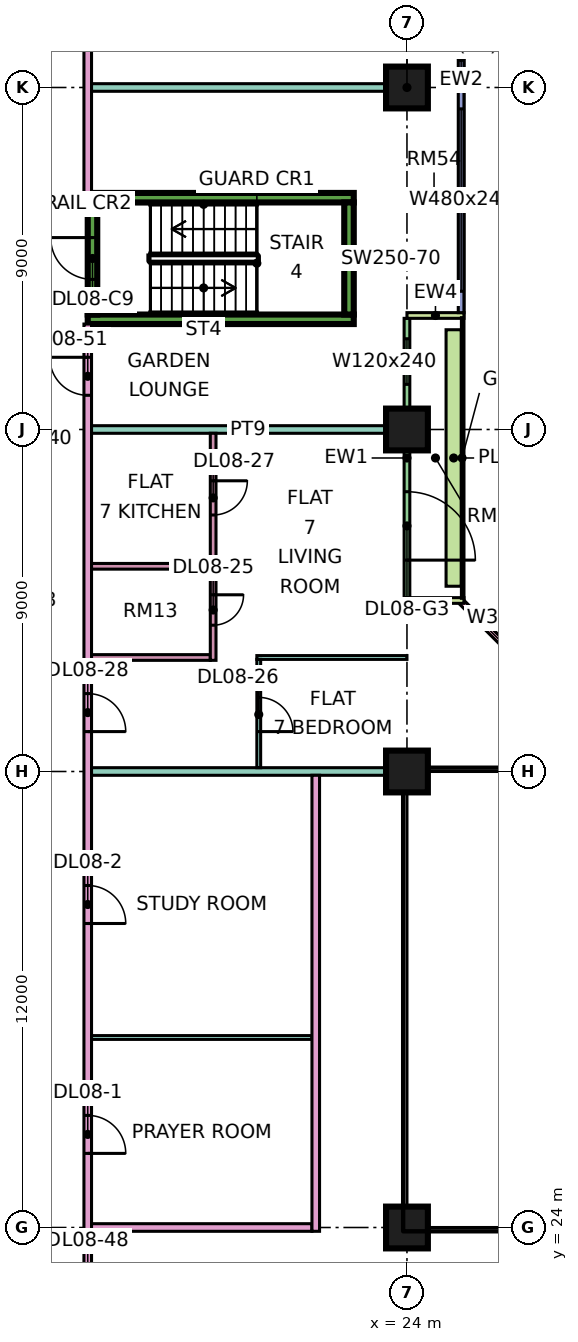
"""IFC4 building model, lengths in metres.
Left out: names, types, materials, properties, quantities, classifications, styles, units other than length and angle.
Written with IfcOpenShell. Run it as: python <this file> out.ifc"""

import sys

from ifc_helpers import new_model, si_unit, direction, frame, frame_2d, origin, origin_2d, place, context, subcontext, project, spatial, rectangle, extrude, element, fill, save


model = new_model("IFC4")
c1 = context("Model", 3, precision=1e-05, world=origin(), true_north=direction((0.0, 1.0)))
c2 = subcontext(c1, "Body", "Model", "MODEL_VIEW")
j1 = project(units=[si_unit("LENGTHUNIT", "METRE"), si_unit("PLANEANGLEUNIT", "RADIAN")], contexts=[c1])
p1 = place(None, origin())
s1 = spatial("IfcSite", under=j1, at=p1, CompositionType="ELEMENT")
p2 = place(p1, origin())
s2 = spatial("IfcBuilding", under=s1, at=p2, CompositionType="ELEMENT")
p3 = place(p2, frame((0.0, 0.0, 45.15)))
s3 = spatial("IfcBuildingStorey", under=s2, at=p3, CompositionType="ELEMENT", Elevation=45.15)
for number, where, z_axis, x_axis in (
    (1, (24.0, 24.0, 0.0), (0.0, 0.0, 1.0), (1.0, 0.0, 0.0)),
    (2, (24.0, 36.0, 0.0), (0.0, 0.0, 1.0), (1.0, 0.0, 0.0)),
    (3, (24.0, 45.0, 0.0), (0.0, 0.0, 1.0), (1.0, 0.0, 0.0)),
    (4, (24.0, 54.0, 0.0), (0.0, 0.0, 1.0), (1.0, 0.0, 0.0)),
):
    element("IfcColumn", number, at=place(p3, frame(where, z_axis=z_axis, x_axis=x_axis)), inside=s3, PredefinedType="COLUMN", context=c2, shape_type="SweptSolid", body=[
        extrude(rectangle(XDim=1.1, YDim=1.1, at=origin_2d()), origin(), (0.0, 0.0, 1.0), 3.75),
    ])
for number, where, z_axis, x_axis in (
    (5, (15.6, 47.9, 0.0), (0.0, 0.0, 1.0), (1.0, 0.0, 0.0)),
    (6, (15.6, 51.1, 0.0), (0.0, 0.0, 1.0), (1.0, 0.0, 0.0)),
):
    element("IfcWall", number, at=place(p3, frame(where, z_axis=z_axis, x_axis=x_axis)), inside=s3, PredefinedType="SHEAR", context=c2, shape_type="SweptSolid", body=[
        extrude(rectangle(XDim=7.0, YDim=0.25, at=frame_2d((3.5, 0.0))), origin(), (0.0, 0.0, 1.0), 3.75),
    ])
p4 = place(p3, frame((15.725, 48.025, 0.0), z_axis=(0.0, 0.0, 1.0), x_axis=(0.0, 1.0, 0.0)))
e7 = element("IfcWall", 7, at=p4, inside=s3, PredefinedType="SHEAR", context=c2, shape_type="SweptSolid", body=[
    extrude(rectangle(XDim=2.95, YDim=0.25, at=frame_2d((1.475, 0.0))), origin(), (0.0, 0.0, 1.0), 3.75),
])
p5 = place(p4, frame((0.925, 0.0, 0.0)))
e8 = element("IfcOpeningElement", 8, at=p5, cuts=e7, PredefinedType="OPENING", context=c2, shape_type="SweptSolid", body=[
    extrude(rectangle(XDim=1.1, YDim=2.2, at=frame_2d((0.55, 1.1))), frame((0.0, 0.135, 0.0), z_axis=(0.0, -1.0, 0.0), x_axis=(1.0, 0.0, 0.0)), (0.0, 0.0, 1.0), 0.27),
])
p6 = place(p3, frame((22.475, 48.025, 0.0), z_axis=(0.0, 0.0, 1.0), x_axis=(0.0, 1.0, 0.0)))
e9 = element("IfcWall", 9, at=p6, inside=s3, PredefinedType="SHEAR", context=c2, shape_type="SweptSolid", body=[
    extrude(rectangle(XDim=2.95, YDim=0.25, at=frame_2d((1.475, 0.0))), origin(), (0.0, 0.0, 1.0), 3.75),
])
p7 = place(p3, frame((28.447, 37.447, 0.0), z_axis=(0.0, 0.0, 1.0), x_axis=(-0.707106781187, 0.707106781187, 0.0)))
e10 = element("IfcWall", 10, at=p7, inside=s3, PredefinedType="SOLIDWALL", context=c2, shape_type="SweptSolid", body=[
    extrude(rectangle(XDim=4.243, YDim=0.15, at=frame_2d((2.121, 0.0))), origin(), (0.0, 0.0, 1.0), 3.35),
])
p8 = place(p7, frame((0.621, 0.0, 0.45)))
e11 = element("IfcOpeningElement", 11, at=p8, cuts=e10, PredefinedType="OPENING", context=c2, shape_type="SweptSolid", body=[
    extrude(rectangle(XDim=3.0, YDim=2.4, at=frame_2d((1.5, 1.2))), frame((0.0, 0.085, 0.0), z_axis=(0.0, -1.0, 0.0), x_axis=(1.0, 0.0, 0.0)), (0.0, 0.0, 1.0), 0.17),
])
p9 = place(p3, frame((24.0, 40.575, 0.0), z_axis=(0.0, 0.0, 1.0), x_axis=(0.0, 1.0, 0.0)))
e12 = element("IfcWall", 12, at=p9, inside=s3, PredefinedType="SOLIDWALL", context=c2, shape_type="SweptSolid", body=[
    extrude(rectangle(XDim=7.35, YDim=0.15, at=frame_2d((3.675, 0.0))), origin(), (0.0, 0.0, 1.0), 3.35),
])
p10 = place(p9, frame((0.988, 0.0, 0.0)))
e13 = element("IfcOpeningElement", 13, at=p10, cuts=e12, PredefinedType="OPENING", context=c2, shape_type="SweptSolid", body=[
    extrude(rectangle(XDim=1.8, YDim=2.4, at=frame_2d((0.9, 1.2))), frame((0.0, 0.085, 0.0), z_axis=(0.0, -1.0, 0.0), x_axis=(1.0, 0.0, 0.0)), (0.0, 0.0, 1.0), 0.17),
])
p11 = place(p9, frame((5.613, 0.0, 0.45)))
e14 = element("IfcOpeningElement", 14, at=p11, cuts=e12, PredefinedType="OPENING", context=c2, shape_type="SweptSolid", body=[
    extrude(rectangle(XDim=1.2, YDim=2.4, at=frame_2d((0.6, 1.2))), frame((0.0, 0.085, 0.0), z_axis=(0.0, -1.0, 0.0), x_axis=(1.0, 0.0, 0.0)), (0.0, 0.0, 1.0), 0.17),
])
for number, where, z_axis, x_axis in (
    (15, (25.5, 40.5, 0.0), (0.0, 0.0, 1.0), (-1.0, 0.0, 0.0)),
    (16, (25.5, 48.0, 0.0), (0.0, 0.0, 1.0), (-1.0, 0.0, 0.0)),
):
    element("IfcWall", number, at=place(p3, frame(where, z_axis=z_axis, x_axis=x_axis)), inside=s3, PredefinedType="SOLIDWALL", context=c2, shape_type="SweptSolid", body=[
        extrude(rectangle(XDim=1.5, YDim=0.15, at=frame_2d((0.75, 0.0))), origin(), (0.0, 0.0, 1.0), 3.35),
    ])
p12 = place(p3, frame((25.425, 48.075, 0.0), z_axis=(0.0, 0.0, 1.0), x_axis=(0.0, 1.0, 0.0)))
e17 = element("IfcWall", 17, at=p12, inside=s3, PredefinedType="SOLIDWALL", context=c2, shape_type="SweptSolid", body=[
    extrude(rectangle(XDim=13.425, YDim=0.15, at=frame_2d((6.712, 0.0))), origin(), (0.0, 0.0, 1.0), 3.35),
])
p13 = place(p12, frame((0.562, 0.0, 0.45)))
e18 = element("IfcOpeningElement", 18, at=p13, cuts=e17, PredefinedType="OPENING", context=c2, shape_type="SweptSolid", body=[
    extrude(rectangle(XDim=4.8, YDim=2.4, at=frame_2d((2.4, 1.2))), frame((0.0, 0.085, 0.0), z_axis=(0.0, -1.0, 0.0), x_axis=(1.0, 0.0, 0.0)), (0.0, 0.0, 1.0), 0.17),
])
p14 = place(p12, frame((7.425, 0.0, 0.45)))
e19 = element("IfcOpeningElement", 19, at=p14, cuts=e17, PredefinedType="OPENING", context=c2, shape_type="SweptSolid", body=[
    extrude(rectangle(XDim=3.0, YDim=2.4, at=frame_2d((1.5, 1.2))), frame((0.0, 0.085, 0.0), z_axis=(0.0, -1.0, 0.0), x_axis=(1.0, 0.0, 0.0)), (0.0, 0.0, 1.0), 0.17),
])
p15 = place(p12, frame((12.225, 0.0, 0.45)))
e20 = element("IfcOpeningElement", 20, at=p15, cuts=e17, PredefinedType="OPENING", context=c2, shape_type="SweptSolid", body=[
    extrude(rectangle(XDim=0.9, YDim=2.4, at=frame_2d((0.45, 1.2))), frame((0.0, 0.085, 0.0), z_axis=(0.0, -1.0, 0.0), x_axis=(1.0, 0.0, 0.0)), (0.0, 0.0, 1.0), 0.17),
])
p16 = place(p3, frame((25.229, 40.875, 0.0), z_axis=(0.0, 0.0, 1.0), x_axis=(0.0, 1.0, 0.0)))
e21 = element("IfcWall", 21, at=p16, inside=s3, PredefinedType="SOLIDWALL", context=c2, shape_type="SweptSolid", body=[
    extrude(rectangle(XDim=6.75, YDim=0.4, at=frame_2d((3.375, 0.0))), origin(), (0.0, 0.0, 1.0), 0.7),
])
p17 = place(p3, frame((15.6, 20.0, 0.0), z_axis=(0.0, 0.0, 1.0), x_axis=(0.0, 1.0, 0.0)))
e22 = element("IfcWall", 22, at=p17, inside=s3, PredefinedType="PARTITIONING", context=c2, shape_type="SweptSolid", body=[
    extrude(rectangle(XDim=27.775, YDim=0.2, at=frame_2d((13.887, 0.0))), origin(), (0.0, 0.0, 1.0), 3.35),
])
p18 = place(p17, frame((5.95, 0.0, 0.0)))
e23 = element("IfcOpeningElement", 23, at=p18, cuts=e22, PredefinedType="OPENING", context=c2, shape_type="SweptSolid", body=[
    extrude(rectangle(XDim=1.0, YDim=2.1, at=frame_2d((0.5, 1.05))), frame((0.0, 0.11, 0.0), z_axis=(0.0, -1.0, 0.0), x_axis=(1.0, 0.0, 0.0)), (0.0, 0.0, 1.0), 0.22),
])
p19 = place(p17, frame((12.0, 0.0, 0.0)))
e24 = element("IfcOpeningElement", 24, at=p19, cuts=e22, PredefinedType="OPENING", context=c2, shape_type="SweptSolid", body=[
    extrude(rectangle(XDim=1.0, YDim=2.1, at=frame_2d((0.5, 1.05))), frame((0.0, 0.11, 0.0), z_axis=(0.0, -1.0, 0.0), x_axis=(1.0, 0.0, 0.0)), (0.0, 0.0, 1.0), 0.22),
])
p20 = place(p17, frame((17.05, 0.0, 0.0)))
e25 = element("IfcOpeningElement", 25, at=p20, cuts=e22, PredefinedType="OPENING", context=c2, shape_type="SweptSolid", body=[
    extrude(rectangle(XDim=1.0, YDim=2.1, at=frame_2d((0.5, 1.05))), frame((0.0, 0.11, 0.0), z_axis=(0.0, -1.0, 0.0), x_axis=(1.0, 0.0, 0.0)), (0.0, 0.0, 1.0), 0.22),
])
p21 = place(p17, frame((1.15, 0.0, 0.0)))
e26 = element("IfcOpeningElement", 26, at=p21, cuts=e22, PredefinedType="OPENING", context=c2, shape_type="SweptSolid", body=[
    extrude(rectangle(XDim=1.8, YDim=2.1, at=frame_2d((0.9, 1.05))), frame((0.0, 0.11, 0.0), z_axis=(0.0, -1.0, 0.0), x_axis=(1.0, 0.0, 0.0)), (0.0, 0.0, 1.0), 0.22),
])
p22 = place(p17, frame((25.9, 0.0, 0.0)))
e27 = element("IfcOpeningElement", 27, at=p22, cuts=e22, PredefinedType="OPENING", context=c2, shape_type="SweptSolid", body=[
    extrude(rectangle(XDim=1.0, YDim=2.1, at=frame_2d((0.5, 1.05))), frame((0.0, 0.11, 0.0), z_axis=(0.0, -1.0, 0.0), x_axis=(1.0, 0.0, 0.0)), (0.0, 0.0, 1.0), 0.22),
])
p23 = place(p3, frame((15.6, 51.225, 0.0), z_axis=(0.0, 0.0, 1.0), x_axis=(0.0, 1.0, 0.0)))
e28 = element("IfcWall", 28, at=p23, inside=s3, PredefinedType="PARTITIONING", context=c2, shape_type="SweptSolid", body=[
    extrude(rectangle(XDim=11.701, YDim=0.2, at=frame_2d((5.851, 0.0))), origin(), (0.0, 0.0, 1.0), 3.35),
])
p24 = place(p23, frame((4.125, 0.0, 0.0)))
e29 = element("IfcOpeningElement", 29, at=p24, cuts=e28, PredefinedType="OPENING", context=c2, shape_type="SweptSolid", body=[
    extrude(rectangle(XDim=1.0, YDim=2.1, at=frame_2d((0.5, 1.05))), frame((0.0, 0.11, 0.0), z_axis=(0.0, -1.0, 0.0), x_axis=(1.0, 0.0, 0.0)), (0.0, 0.0, 1.0), 0.22),
])
p25 = place(p3, frame((15.7, 24.0, 0.0), z_axis=(0.0, 0.0, 1.0), x_axis=(1.0, 0.0, 0.0)))
e30 = element("IfcWall", 30, at=p25, inside=s3, PredefinedType="PARTITIONING", context=c2, shape_type="SweptSolid", body=[
    extrude(rectangle(XDim=5.8, YDim=0.2, at=frame_2d((2.9, 0.0))), origin(), (0.0, 0.0, 1.0), 3.35),
])
p26 = place(p3, frame((15.7, 29.0, 0.0), z_axis=(0.0, 0.0, 1.0), x_axis=(1.0, 0.0, 0.0)))
e31 = element("IfcWall", 31, at=p26, inside=s3, PredefinedType="PARTITIONING", context=c2, shape_type="SweptSolid", body=[
    extrude(rectangle(XDim=5.8, YDim=0.1, at=frame_2d((2.9, 0.0))), origin(), (0.0, 0.0, 1.0), 3.35),
])
p27 = place(p3, frame((15.7, 36.0, 0.0), z_axis=(0.0, 0.0, 1.0), x_axis=(1.0, 0.0, 0.0)))
e32 = element("IfcWall", 32, at=p27, inside=s3, PredefinedType="PARTITIONING", context=c2, shape_type="SweptSolid", body=[
    extrude(rectangle(XDim=8.3, YDim=0.2, at=frame_2d((4.15, 0.0))), origin(), (0.0, 0.0, 1.0), 3.35),
])
for number, where, z_axis, x_axis in (
    (33, (15.7, 39.0, 0.0), (0.0, 0.0, 1.0), (1.0, 0.0, 0.0)),
    (34, (15.7, 41.4, 0.0), (0.0, 0.0, 1.0), (1.0, 0.0, 0.0)),
):
    element("IfcWall", number, at=place(p3, frame(where, z_axis=z_axis, x_axis=x_axis)), inside=s3, PredefinedType="PARTITIONING", context=c2, shape_type="SweptSolid", body=[
        extrude(rectangle(XDim=3.125, YDim=0.15, at=frame_2d((1.562, 0.0))), origin(), (0.0, 0.0, 1.0), 3.35),
    ])
p28 = place(p3, frame((15.7, 45.0, 0.0), z_axis=(0.0, 0.0, 1.0), x_axis=(1.0, 0.0, 0.0)))
e35 = element("IfcWall", 35, at=p28, inside=s3, PredefinedType="PARTITIONING", context=c2, shape_type="SweptSolid", body=[
    extrude(rectangle(XDim=8.226, YDim=0.2, at=frame_2d((4.113, 0.0))), origin(), (0.0, 0.0, 1.0), 3.35),
])
p29 = place(p3, frame((15.7, 54.0, 0.0), z_axis=(0.0, 0.0, 1.0), x_axis=(1.0, 0.0, 0.0)))
e36 = element("IfcWall", 36, at=p29, inside=s3, PredefinedType="PARTITIONING", context=c2, shape_type="SweptSolid", body=[
    extrude(rectangle(XDim=8.3, YDim=0.2, at=frame_2d((4.15, 0.0))), origin(), (0.0, 0.0, 1.0), 3.35),
])
p30 = place(p3, frame((18.9, 38.925, 0.0), z_axis=(0.0, 0.0, 1.0), x_axis=(0.0, 1.0, 0.0)))
e37 = element("IfcWall", 37, at=p30, inside=s3, PredefinedType="PARTITIONING", context=c2, shape_type="SweptSolid", body=[
    extrude(rectangle(XDim=5.975, YDim=0.15, at=frame_2d((2.987, 0.0))), origin(), (0.0, 0.0, 1.0), 3.35),
])
p31 = place(p30, frame((0.925, 0.0, 0.0)))
e38 = element("IfcOpeningElement", 38, at=p31, cuts=e37, PredefinedType="OPENING", context=c2, shape_type="SweptSolid", body=[
    extrude(rectangle(XDim=0.8, YDim=2.1, at=frame_2d((0.4, 1.05))), frame((0.0, 0.085, 0.0), z_axis=(0.0, -1.0, 0.0), x_axis=(1.0, 0.0, 0.0)), (0.0, 0.0, 1.0), 0.17),
])
p32 = place(p30, frame((3.825, 0.0, 0.0)))
e39 = element("IfcOpeningElement", 39, at=p32, cuts=e37, PredefinedType="OPENING", context=c2, shape_type="SweptSolid", body=[
    extrude(rectangle(XDim=0.9, YDim=2.1, at=frame_2d((0.45, 1.05))), frame((0.0, 0.085, 0.0), z_axis=(0.0, -1.0, 0.0), x_axis=(1.0, 0.0, 0.0)), (0.0, 0.0, 1.0), 0.17),
])
p33 = place(p3, frame((20.05, 39.0, 0.0), z_axis=(0.0, 0.0, 1.0), x_axis=(1.0, 0.0, 0.0)))
e40 = element("IfcWall", 40, at=p33, inside=s3, PredefinedType="PARTITIONING", context=c2, shape_type="SweptSolid", body=[
    extrude(rectangle(XDim=3.95, YDim=0.1, at=frame_2d((1.975, 0.0))), origin(), (0.0, 0.0, 1.0), 3.35),
])
p34 = place(p3, frame((20.1, 36.1, 0.0), z_axis=(0.0, 0.0, 1.0), x_axis=(0.0, 1.0, 0.0)))
e41 = element("IfcWall", 41, at=p34, inside=s3, PredefinedType="PARTITIONING", context=c2, shape_type="SweptSolid", body=[
    extrude(rectangle(XDim=2.85, YDim=0.1, at=frame_2d((1.425, 0.0))), origin(), (0.0, 0.0, 1.0), 3.35),
])
p35 = place(p34, frame((0.95, 0.0, 0.0)))
e42 = element("IfcOpeningElement", 42, at=p35, cuts=e41, PredefinedType="OPENING", context=c2, shape_type="SweptSolid", body=[
    extrude(rectangle(XDim=0.9, YDim=2.1, at=frame_2d((0.45, 1.05))), frame((0.0, 0.06, 0.0), z_axis=(0.0, -1.0, 0.0), x_axis=(1.0, 0.0, 0.0)), (0.0, 0.0, 1.0), 0.12),
])
p36 = place(p3, frame((21.6, 23.9, 0.0), z_axis=(0.0, 0.0, 1.0), x_axis=(0.0, 1.0, 0.0)))
e43 = element("IfcWall", 43, at=p36, inside=s3, PredefinedType="PARTITIONING", context=c2, shape_type="SweptSolid", body=[
    extrude(rectangle(XDim=12.0, YDim=0.2, at=frame_2d((6.0, 0.0))), origin(), (0.0, 0.0, 1.0), 3.35),
])
p37 = place(p8, origin())
e44 = element("IfcWindow", 44, at=p37, inside=s3, PartitioningType="SINGLE_PANEL", PredefinedType="WINDOW", context=c2, shape_type="SweptSolid", body=[
    extrude(rectangle(XDim=3.0, YDim=2.4, at=frame_2d((1.5, 1.2))), frame((0.0, 0.03, 0.0), z_axis=(0.0, -1.0, 0.0), x_axis=(1.0, 0.0, 0.0)), (0.0, 0.0, 1.0), 0.06),
])
fill(e11, e44)
p38 = place(p10, frame((1.8, 0.0, 0.0), z_axis=(0.0, 0.0, 1.0), x_axis=(-1.0, 0.0, 0.0)))
e45 = element("IfcDoor", 45, at=p38, inside=s3, OperationType="DOUBLE_DOOR_SINGLE_SWING", PredefinedType="DOOR", context=c2, shape_type="SweptSolid", body=[
    extrude(rectangle(XDim=1.8, YDim=2.4, at=frame_2d((0.9, 1.2))), frame((0.0, 0.025, 0.0), z_axis=(0.0, -1.0, 0.0), x_axis=(1.0, 0.0, 0.0)), (0.0, 0.0, 1.0), 0.05),
])
fill(e13, e45)
p39 = place(p11, origin())
e46 = element("IfcWindow", 46, at=p39, inside=s3, PartitioningType="SINGLE_PANEL", PredefinedType="WINDOW", context=c2, shape_type="SweptSolid", body=[
    extrude(rectangle(XDim=1.2, YDim=2.4, at=frame_2d((0.6, 1.2))), frame((0.0, 0.03, 0.0), z_axis=(0.0, -1.0, 0.0), x_axis=(1.0, 0.0, 0.0)), (0.0, 0.0, 1.0), 0.06),
])
fill(e14, e46)
p40 = place(p13, origin())
e47 = element("IfcWindow", 47, at=p40, inside=s3, PartitioningType="SINGLE_PANEL", PredefinedType="WINDOW", context=c2, shape_type="SweptSolid", body=[
    extrude(rectangle(XDim=4.8, YDim=2.4, at=frame_2d((2.4, 1.2))), frame((0.0, 0.03, 0.0), z_axis=(0.0, -1.0, 0.0), x_axis=(1.0, 0.0, 0.0)), (0.0, 0.0, 1.0), 0.06),
])
fill(e18, e47)
p41 = place(p5, frame((1.1, 0.0, 0.0), z_axis=(0.0, 0.0, 1.0), x_axis=(-1.0, 0.0, 0.0)))
e48 = element("IfcDoor", 48, at=p41, inside=s3, OperationType="SINGLE_SWING_RIGHT", PredefinedType="DOOR", context=c2, shape_type="SweptSolid", body=[
    extrude(rectangle(XDim=1.1, YDim=2.2, at=frame_2d((0.55, 1.1))), frame((0.0, 0.025, 0.0), z_axis=(0.0, -1.0, 0.0), x_axis=(1.0, 0.0, 0.0)), (0.0, 0.0, 1.0), 0.05),
])
fill(e8, e48)
p42 = place(p18, frame((1.0, 0.0, 0.0), z_axis=(0.0, 0.0, 1.0), x_axis=(-1.0, 0.0, 0.0)))
e49 = element("IfcDoor", 49, at=p42, inside=s3, OperationType="SINGLE_SWING_LEFT", PredefinedType="DOOR", context=c2, shape_type="SweptSolid", body=[
    extrude(rectangle(XDim=1.0, YDim=2.1, at=frame_2d((0.5, 1.05))), frame((0.0, 0.025, 0.0), z_axis=(0.0, -1.0, 0.0), x_axis=(1.0, 0.0, 0.0)), (0.0, 0.0, 1.0), 0.05),
])
fill(e23, e49)
p43 = place(p19, frame((1.0, 0.0, 0.0), z_axis=(0.0, 0.0, 1.0), x_axis=(-1.0, 0.0, 0.0)))
e50 = element("IfcDoor", 50, at=p43, inside=s3, OperationType="SINGLE_SWING_LEFT", PredefinedType="DOOR", context=c2, shape_type="SweptSolid", body=[
    extrude(rectangle(XDim=1.0, YDim=2.1, at=frame_2d((0.5, 1.05))), frame((0.0, 0.025, 0.0), z_axis=(0.0, -1.0, 0.0), x_axis=(1.0, 0.0, 0.0)), (0.0, 0.0, 1.0), 0.05),
])
fill(e24, e50)
p44 = place(p31, origin())
e51 = element("IfcDoor", 51, at=p44, inside=s3, OperationType="SINGLE_SWING_RIGHT", PredefinedType="DOOR", context=c2, shape_type="SweptSolid", body=[
    extrude(rectangle(XDim=0.8, YDim=2.1, at=frame_2d((0.4, 1.05))), frame((0.0, 0.025, 0.0), z_axis=(0.0, -1.0, 0.0), x_axis=(1.0, 0.0, 0.0)), (0.0, 0.0, 1.0), 0.05),
])
fill(e38, e51)
p45 = place(p35, frame((0.9, 0.0, 0.0), z_axis=(0.0, 0.0, 1.0), x_axis=(-1.0, 0.0, 0.0)))
e52 = element("IfcDoor", 52, at=p45, inside=s3, OperationType="SINGLE_SWING_LEFT", PredefinedType="DOOR", context=c2, shape_type="SweptSolid", body=[
    extrude(rectangle(XDim=0.9, YDim=2.1, at=frame_2d((0.45, 1.05))), frame((0.0, 0.025, 0.0), z_axis=(0.0, -1.0, 0.0), x_axis=(1.0, 0.0, 0.0)), (0.0, 0.0, 1.0), 0.05),
])
fill(e42, e52)
p46 = place(p32, origin())
e53 = element("IfcDoor", 53, at=p46, inside=s3, OperationType="SINGLE_SWING_RIGHT", PredefinedType="DOOR", context=c2, shape_type="SweptSolid", body=[
    extrude(rectangle(XDim=0.9, YDim=2.1, at=frame_2d((0.45, 1.05))), frame((0.0, 0.025, 0.0), z_axis=(0.0, -1.0, 0.0), x_axis=(1.0, 0.0, 0.0)), (0.0, 0.0, 1.0), 0.05),
])
fill(e39, e53)
p47 = place(p20, frame((1.0, 0.0, 0.0), z_axis=(0.0, 0.0, 1.0), x_axis=(-1.0, 0.0, 0.0)))
e54 = element("IfcDoor", 54, at=p47, inside=s3, OperationType="SINGLE_SWING_LEFT", PredefinedType="DOOR", context=c2, shape_type="SweptSolid", body=[
    extrude(rectangle(XDim=1.0, YDim=2.1, at=frame_2d((0.5, 1.05))), frame((0.0, 0.025, 0.0), z_axis=(0.0, -1.0, 0.0), x_axis=(1.0, 0.0, 0.0)), (0.0, 0.0, 1.0), 0.05),
])
fill(e25, e54)
p48 = place(p22, frame((1.0, 0.0, 0.0), z_axis=(0.0, 0.0, 1.0), x_axis=(-1.0, 0.0, 0.0)))
e55 = element("IfcDoor", 55, at=p48, inside=s3, OperationType="SINGLE_SWING_RIGHT", PredefinedType="DOOR", context=c2, shape_type="SweptSolid", body=[
    extrude(rectangle(XDim=1.0, YDim=2.1, at=frame_2d((0.5, 1.05))), frame((0.0, 0.025, 0.0), z_axis=(0.0, -1.0, 0.0), x_axis=(1.0, 0.0, 0.0)), (0.0, 0.0, 1.0), 0.05),
])
fill(e27, e55)
save(model, sys.argv[1])
